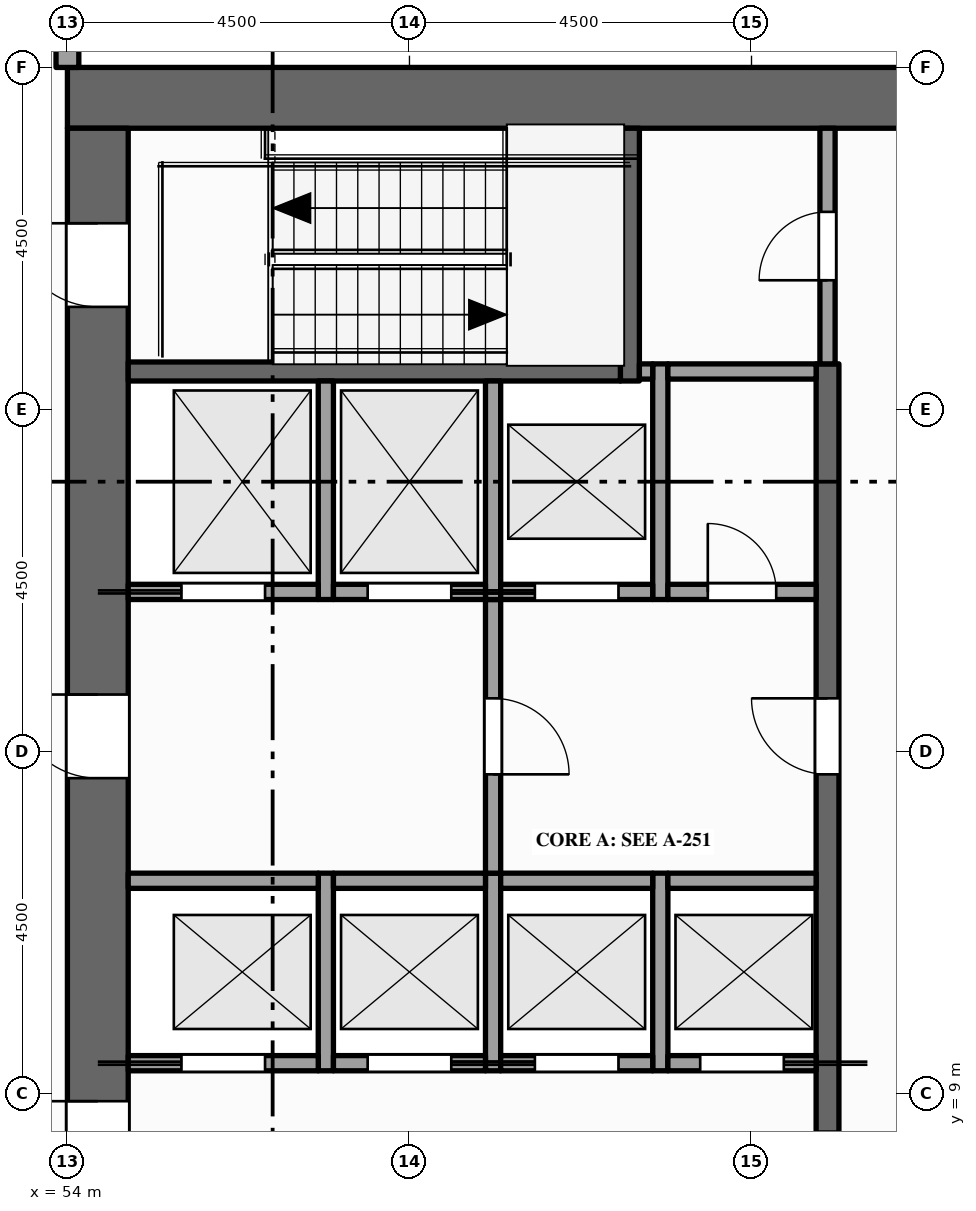
"""IFC4 building model, lengths in metres.
Left out: names, types, materials, properties, quantities, classifications, styles, units other than length and angle.
Written with IfcOpenShell. Run it as: python <this file> out.ifc"""

import sys

from ifc_helpers import new_model, si_unit, direction, frame, frame_2d, origin, place, context, subcontext, project, spatial, rectangle, extrude, element, fill, save


model = new_model("IFC4")
c1 = context("Model", 3, precision=1e-05, world=origin(), true_north=direction((0.0, 1.0)))
c2 = subcontext(c1, "Body", "Model", "MODEL_VIEW")
j1 = project(units=[si_unit("LENGTHUNIT", "METRE"), si_unit("PLANEANGLEUNIT", "RADIAN")], contexts=[c1])
p1 = place(None, origin())
s1 = spatial("IfcSite", under=j1, at=p1, CompositionType="ELEMENT")
p2 = place(p1, origin())
s2 = spatial("IfcBuilding", under=s1, at=p2, CompositionType="ELEMENT")
p3 = place(p2, frame((0.0, 0.0, 289.0)))
s3 = spatial("IfcBuildingStorey", under=s2, at=p3, CompositionType="ELEMENT", Elevation=289.0)
p4 = place(p3, frame((54.0, 22.1, -0.15), z_axis=(0.0, 0.0, 1.0), x_axis=(1.0, 0.0, 0.0)))
e1 = element("IfcWall", 1, at=p4, inside=s3, PredefinedType="SHEAR", context=c2, shape_type="SweptSolid", body=[
    extrude(rectangle(XDim=13.5, YDim=0.8, at=frame_2d((6.75, 0.0))), origin(), (0.0, 0.0, 1.0), 4.0),
])
p5 = place(p3, frame((54.4, 0.8, -0.15), z_axis=(0.0, 0.0, 1.0), x_axis=(0.0, 1.0, 0.0)))
e2 = element("IfcWall", 2, at=p5, inside=s3, PredefinedType="SHEAR", context=c2, shape_type="SweptSolid", body=[
    extrude(rectangle(XDim=20.9, YDim=0.8, at=frame_2d((10.45, 0.0))), origin(), (0.0, 0.0, 1.0), 4.0),
])
p6 = place(p5, frame((6.3, 0.0, 0.15)))
e3 = element("IfcOpeningElement", 3, at=p6, cuts=e2, PredefinedType="OPENING", context=c2, shape_type="SweptSolid", body=[
    extrude(rectangle(XDim=1.8, YDim=2.1, at=frame_2d((0.9, 1.05))), frame((0.0, 0.41, 0.0), z_axis=(0.0, -1.0, 0.0), x_axis=(1.0, 0.0, 0.0)), (0.0, 0.0, 1.0), 0.82),
])
p7 = place(p5, frame((12.35, 0.0, 0.15)))
e4 = element("IfcOpeningElement", 4, at=p7, cuts=e2, PredefinedType="OPENING", context=c2, shape_type="SweptSolid", body=[
    extrude(rectangle(XDim=1.1, YDim=2.1, at=frame_2d((0.55, 1.05))), frame((0.0, 0.41, 0.0), z_axis=(0.0, -1.0, 0.0), x_axis=(1.0, 0.0, 0.0)), (0.0, 0.0, 1.0), 0.82),
])
p8 = place(p5, frame((1.35, 0.0, 0.15)))
e5 = element("IfcOpeningElement", 5, at=p8, cuts=e2, PredefinedType="OPENING", context=c2, shape_type="SweptSolid", body=[
    extrude(rectangle(XDim=1.1, YDim=2.1, at=frame_2d((0.55, 1.05))), frame((0.0, 0.41, 0.0), z_axis=(0.0, -1.0, 0.0), x_axis=(1.0, 0.0, 0.0)), (0.0, 0.0, 1.0), 0.82),
])
p9 = place(p5, frame((18.55, 0.0, 0.15)))
e6 = element("IfcOpeningElement", 6, at=p9, cuts=e2, PredefinedType="OPENING", context=c2, shape_type="SweptSolid", body=[
    extrude(rectangle(XDim=1.1, YDim=2.1, at=frame_2d((0.55, 1.05))), frame((0.0, 0.41, 0.0), z_axis=(0.0, -1.0, 0.0), x_axis=(1.0, 0.0, 0.0)), (0.0, 0.0, 1.0), 0.82),
])
p10 = place(p3, frame((54.0, 22.5, 0.0), z_axis=(0.0, 0.0, 1.0), x_axis=(0.0, 1.0, 0.0)))
e7 = element("IfcWall", 7, at=p10, inside=s3, PredefinedType="STANDARD", context=c2, shape_type="SweptSolid", body=[
    extrude(rectangle(XDim=1.175, YDim=0.3, at=frame_2d((0.587, 0.0))), origin(), (0.0, 0.0, 1.0), 3.162),
])
p11 = place(p3, frame((57.4, 9.3, 0.0), z_axis=(0.0, 0.0, 1.0), x_axis=(0.0, 1.0, 0.0)))
e8 = element("IfcWall", 8, at=p11, inside=s3, PredefinedType="SOLIDWALL", context=c2, shape_type="SweptSolid", body=[
    extrude(rectangle(XDim=2.6, YDim=0.2, at=frame_2d((1.3, 0.0))), origin(), (0.0, 0.0, 1.0), 3.85),
])
p12 = place(p3, frame((57.4, 15.5, 0.0), z_axis=(0.0, 0.0, 1.0), x_axis=(0.0, 1.0, 0.0)))
e9 = element("IfcWall", 9, at=p12, inside=s3, PredefinedType="SOLIDWALL", context=c2, shape_type="SweptSolid", body=[
    extrude(rectangle(XDim=2.875, YDim=0.2, at=frame_2d((1.438, 0.0))), origin(), (0.0, 0.0, 1.0), 3.85),
])
p13 = place(p3, frame((59.6, 9.3, 0.0), z_axis=(0.0, 0.0, 1.0), x_axis=(0.0, 1.0, 0.0)))
e10 = element("IfcWall", 10, at=p13, inside=s3, PredefinedType="SOLIDWALL", context=c2, shape_type="SweptSolid", body=[
    extrude(rectangle(XDim=2.6, YDim=0.2, at=frame_2d((1.3, 0.0))), origin(), (0.0, 0.0, 1.0), 3.85),
])
p14 = place(p3, frame((59.6, 11.9, 0.0), z_axis=(0.0, 0.0, 1.0), x_axis=(0.0, 1.0, 0.0)))
e11 = element("IfcWall", 11, at=p14, inside=s3, PredefinedType="PARTITIONING", context=c2, shape_type="SweptSolid", body=[
    extrude(rectangle(XDim=3.6, YDim=0.2, at=frame_2d((1.8, 0.0))), origin(), (0.0, 0.0, 1.0), 3.85),
])
p15 = place(p14, frame((1.3, 0.0, 0.0)))
e12 = element("IfcOpeningElement", 12, at=p15, cuts=e11, PredefinedType="OPENING", context=c2, shape_type="SweptSolid", body=[
    extrude(rectangle(XDim=1.0, YDim=2.1, at=frame_2d((0.5, 1.05))), frame((0.0, 0.11, 0.0), z_axis=(0.0, -1.0, 0.0), x_axis=(1.0, 0.0, 0.0)), (0.0, 0.0, 1.0), 0.22),
])
p16 = place(p3, frame((59.6, 15.5, 0.0), z_axis=(0.0, 0.0, 1.0), x_axis=(0.0, 1.0, 0.0)))
e13 = element("IfcWall", 13, at=p16, inside=s3, PredefinedType="SOLIDWALL", context=c2, shape_type="SweptSolid", body=[
    extrude(rectangle(XDim=2.875, YDim=0.2, at=frame_2d((1.438, 0.0))), origin(), (0.0, 0.0, 1.0), 3.85),
])
p17 = place(p3, frame((61.4, 18.375, 0.0), z_axis=(0.0, 0.0, 1.0), x_axis=(0.0, 1.0, 0.0)))
e14 = element("IfcWall", 14, at=p17, inside=s3, PredefinedType="SHEAR", context=c2, shape_type="SweptSolid", body=[
    extrude(rectangle(XDim=3.325, YDim=0.25, at=frame_2d((1.663, 0.0))), origin(), (0.0, 0.0, 1.0), 3.85),
])
p18 = place(p3, frame((61.8, 9.3, 0.0), z_axis=(0.0, 0.0, 1.0), x_axis=(0.0, 1.0, 0.0)))
e15 = element("IfcWall", 15, at=p18, inside=s3, PredefinedType="SOLIDWALL", context=c2, shape_type="SweptSolid", body=[
    extrude(rectangle(XDim=2.6, YDim=0.2, at=frame_2d((1.3, 0.0))), origin(), (0.0, 0.0, 1.0), 3.85),
])
p19 = place(p3, frame((61.8, 15.5, 0.0), z_axis=(0.0, 0.0, 1.0), x_axis=(0.0, 1.0, 0.0)))
e16 = element("IfcWall", 16, at=p19, inside=s3, PredefinedType="SOLIDWALL", context=c2, shape_type="SweptSolid", body=[
    extrude(rectangle(XDim=3.1, YDim=0.2, at=frame_2d((1.55, 0.0))), origin(), (0.0, 0.0, 1.0), 3.85),
])
p20 = place(p3, frame((64.0, 4.1, 0.0), z_axis=(0.0, 0.0, 1.0), x_axis=(0.0, 1.0, 0.0)))
e17 = element("IfcWall", 17, at=p20, inside=s3, PredefinedType="SHEAR", context=c2, shape_type="SweptSolid", body=[
    extrude(rectangle(XDim=14.5, YDim=0.3, at=frame_2d((7.25, 0.0))), origin(), (0.0, 0.0, 1.0), 3.85),
])
p21 = place(p20, frame((3.4, 0.0, 0.0)))
e18 = element("IfcOpeningElement", 18, at=p21, cuts=e17, PredefinedType="OPENING", context=c2, shape_type="SweptSolid", body=[
    extrude(rectangle(XDim=1.0, YDim=2.1, at=frame_2d((0.5, 1.05))), frame((0.0, 0.16, 0.0), z_axis=(0.0, -1.0, 0.0), x_axis=(1.0, 0.0, 0.0)), (0.0, 0.0, 1.0), 0.32),
])
p22 = place(p20, frame((9.1, 0.0, 0.0)))
e19 = element("IfcOpeningElement", 19, at=p22, cuts=e17, PredefinedType="OPENING", context=c2, shape_type="SweptSolid", body=[
    extrude(rectangle(XDim=1.0, YDim=2.1, at=frame_2d((0.5, 1.05))), frame((0.0, 0.16, 0.0), z_axis=(0.0, -1.0, 0.0), x_axis=(1.0, 0.0, 0.0)), (0.0, 0.0, 1.0), 0.32),
])
p23 = place(p3, frame((64.0, 18.6, 0.0), z_axis=(0.0, 0.0, 1.0), x_axis=(0.0, 1.0, 0.0)))
e20 = element("IfcWall", 20, at=p23, inside=s3, PredefinedType="PARTITIONING", context=c2, shape_type="SweptSolid", body=[
    extrude(rectangle(XDim=3.1, YDim=0.2, at=frame_2d((1.55, 0.0))), origin(), (0.0, 0.0, 1.0), 3.85),
])
p24 = place(p23, frame((1.1, 0.0, 0.0)))
e21 = element("IfcOpeningElement", 21, at=p24, cuts=e20, PredefinedType="OPENING", context=c2, shape_type="SweptSolid", body=[
    extrude(rectangle(XDim=0.9, YDim=2.1, at=frame_2d((0.45, 1.05))), frame((0.0, 0.11, 0.0), z_axis=(0.0, -1.0, 0.0), x_axis=(1.0, 0.0, 0.0)), (0.0, 0.0, 1.0), 0.22),
])
p25 = place(p3, frame((54.8, 9.4, 0.0), z_axis=(0.0, 0.0, 1.0), x_axis=(1.0, 0.0, 0.0)))
e22 = element("IfcWall", 22, at=p25, inside=s3, PredefinedType="SOLIDWALL", context=c2, shape_type="SweptSolid", body=[
    extrude(rectangle(XDim=2.5, YDim=0.2, at=frame_2d((1.25, 0.0))), origin(), (0.0, 0.0, 1.0), 3.85),
])
p26 = place(p25, frame((0.7, 0.0, 0.012)))
e23 = element("IfcOpeningElement", 23, at=p26, cuts=e22, PredefinedType="OPENING", context=c2, shape_type="SweptSolid", body=[
    extrude(rectangle(XDim=1.1, YDim=2.1, at=frame_2d((0.55, 1.05))), frame((0.0, 0.11, 0.0), z_axis=(0.0, -1.0, 0.0), x_axis=(1.0, 0.0, 0.0)), (0.0, 0.0, 1.0), 0.22),
])
p27 = place(p3, frame((57.5, 9.4, 0.0), z_axis=(0.0, 0.0, 1.0), x_axis=(1.0, 0.0, 0.0)))
e24 = element("IfcWall", 24, at=p27, inside=s3, PredefinedType="SOLIDWALL", context=c2, shape_type="SweptSolid", body=[
    extrude(rectangle(XDim=2.0, YDim=0.2, at=frame_2d((1.0, 0.0))), origin(), (0.0, 0.0, 1.0), 3.85),
])
p28 = place(p27, frame((0.45, 0.0, 0.012)))
e25 = element("IfcOpeningElement", 25, at=p28, cuts=e24, PredefinedType="OPENING", context=c2, shape_type="SweptSolid", body=[
    extrude(rectangle(XDim=1.1, YDim=2.1, at=frame_2d((0.55, 1.05))), frame((0.0, 0.11, 0.0), z_axis=(0.0, -1.0, 0.0), x_axis=(1.0, 0.0, 0.0)), (0.0, 0.0, 1.0), 0.22),
])
p29 = place(p3, frame((59.7, 9.4, 0.0), z_axis=(0.0, 0.0, 1.0), x_axis=(1.0, 0.0, 0.0)))
e26 = element("IfcWall", 26, at=p29, inside=s3, PredefinedType="SOLIDWALL", context=c2, shape_type="SweptSolid", body=[
    extrude(rectangle(XDim=2.0, YDim=0.2, at=frame_2d((1.0, 0.0))), origin(), (0.0, 0.0, 1.0), 3.85),
])
p30 = place(p29, frame((0.45, 0.0, 0.012)))
e27 = element("IfcOpeningElement", 27, at=p30, cuts=e26, PredefinedType="OPENING", context=c2, shape_type="SweptSolid", body=[
    extrude(rectangle(XDim=1.1, YDim=2.1, at=frame_2d((0.55, 1.05))), frame((0.0, 0.11, 0.0), z_axis=(0.0, -1.0, 0.0), x_axis=(1.0, 0.0, 0.0)), (0.0, 0.0, 1.0), 0.22),
])
p31 = place(p3, frame((61.9, 9.4, 0.0), z_axis=(0.0, 0.0, 1.0), x_axis=(1.0, 0.0, 0.0)))
e28 = element("IfcWall", 28, at=p31, inside=s3, PredefinedType="SOLIDWALL", context=c2, shape_type="SweptSolid", body=[
    extrude(rectangle(XDim=1.95, YDim=0.2, at=frame_2d((0.975, 0.0))), origin(), (0.0, 0.0, 1.0), 3.85),
])
p32 = place(p31, frame((0.425, 0.0, 0.012)))
e29 = element("IfcOpeningElement", 29, at=p32, cuts=e28, PredefinedType="OPENING", context=c2, shape_type="SweptSolid", body=[
    extrude(rectangle(XDim=1.1, YDim=2.1, at=frame_2d((0.55, 1.05))), frame((0.0, 0.11, 0.0), z_axis=(0.0, -1.0, 0.0), x_axis=(1.0, 0.0, 0.0)), (0.0, 0.0, 1.0), 0.22),
])
p33 = place(p3, frame((54.8, 11.8, 0.0), z_axis=(0.0, 0.0, 1.0), x_axis=(1.0, 0.0, 0.0)))
e30 = element("IfcWall", 30, at=p33, inside=s3, PredefinedType="SOLIDWALL", context=c2, shape_type="SweptSolid", body=[
    extrude(rectangle(XDim=2.5, YDim=0.2, at=frame_2d((1.25, 0.0))), origin(), (0.0, 0.0, 1.0), 3.85),
])
for number, where, z_axis, x_axis in (
    (31, (57.5, 11.8, 0.0), (0.0, 0.0, 1.0), (1.0, 0.0, 0.0)),
    (32, (59.7, 11.8, 0.0), (0.0, 0.0, 1.0), (1.0, 0.0, 0.0)),
):
    element("IfcWall", number, at=place(p3, frame(where, z_axis=z_axis, x_axis=x_axis)), inside=s3, PredefinedType="SOLIDWALL", context=c2, shape_type="SweptSolid", body=[
        extrude(rectangle(XDim=2.0, YDim=0.2, at=frame_2d((1.0, 0.0))), origin(), (0.0, 0.0, 1.0), 3.85),
    ])
p34 = place(p3, frame((61.9, 11.8, 0.0), z_axis=(0.0, 0.0, 1.0), x_axis=(1.0, 0.0, 0.0)))
e33 = element("IfcWall", 33, at=p34, inside=s3, PredefinedType="SOLIDWALL", context=c2, shape_type="SweptSolid", body=[
    extrude(rectangle(XDim=1.95, YDim=0.2, at=frame_2d((0.975, 0.0))), origin(), (0.0, 0.0, 1.0), 3.85),
])
p35 = place(p3, frame((54.8, 15.6, 0.0), z_axis=(0.0, 0.0, 1.0), x_axis=(1.0, 0.0, 0.0)))
e34 = element("IfcWall", 34, at=p35, inside=s3, PredefinedType="SOLIDWALL", context=c2, shape_type="SweptSolid", body=[
    extrude(rectangle(XDim=2.5, YDim=0.2, at=frame_2d((1.25, 0.0))), origin(), (0.0, 0.0, 1.0), 3.85),
])
p36 = place(p35, frame((0.7, 0.0, 0.012)))
e35 = element("IfcOpeningElement", 35, at=p36, cuts=e34, PredefinedType="OPENING", context=c2, shape_type="SweptSolid", body=[
    extrude(rectangle(XDim=1.1, YDim=2.1, at=frame_2d((0.55, 1.05))), frame((0.0, 0.11, 0.0), z_axis=(0.0, -1.0, 0.0), x_axis=(1.0, 0.0, 0.0)), (0.0, 0.0, 1.0), 0.22),
])
p37 = place(p3, frame((57.5, 15.6, 0.0), z_axis=(0.0, 0.0, 1.0), x_axis=(1.0, 0.0, 0.0)))
e36 = element("IfcWall", 36, at=p37, inside=s3, PredefinedType="SOLIDWALL", context=c2, shape_type="SweptSolid", body=[
    extrude(rectangle(XDim=2.0, YDim=0.2, at=frame_2d((1.0, 0.0))), origin(), (0.0, 0.0, 1.0), 3.85),
])
p38 = place(p37, frame((0.45, 0.0, 0.012)))
e37 = element("IfcOpeningElement", 37, at=p38, cuts=e36, PredefinedType="OPENING", context=c2, shape_type="SweptSolid", body=[
    extrude(rectangle(XDim=1.1, YDim=2.1, at=frame_2d((0.55, 1.05))), frame((0.0, 0.11, 0.0), z_axis=(0.0, -1.0, 0.0), x_axis=(1.0, 0.0, 0.0)), (0.0, 0.0, 1.0), 0.22),
])
p39 = place(p3, frame((59.7, 15.6, 0.0), z_axis=(0.0, 0.0, 1.0), x_axis=(1.0, 0.0, 0.0)))
e38 = element("IfcWall", 38, at=p39, inside=s3, PredefinedType="SOLIDWALL", context=c2, shape_type="SweptSolid", body=[
    extrude(rectangle(XDim=2.0, YDim=0.2, at=frame_2d((1.0, 0.0))), origin(), (0.0, 0.0, 1.0), 3.85),
])
p40 = place(p39, frame((0.45, 0.0, 0.012)))
e39 = element("IfcOpeningElement", 39, at=p40, cuts=e38, PredefinedType="OPENING", context=c2, shape_type="SweptSolid", body=[
    extrude(rectangle(XDim=1.1, YDim=2.1, at=frame_2d((0.55, 1.05))), frame((0.0, 0.11, 0.0), z_axis=(0.0, -1.0, 0.0), x_axis=(1.0, 0.0, 0.0)), (0.0, 0.0, 1.0), 0.22),
])
p41 = place(p3, frame((61.9, 15.6, 0.0), z_axis=(0.0, 0.0, 1.0), x_axis=(1.0, 0.0, 0.0)))
e40 = element("IfcWall", 40, at=p41, inside=s3, PredefinedType="PARTITIONING", context=c2, shape_type="SweptSolid", body=[
    extrude(rectangle(XDim=1.95, YDim=0.2, at=frame_2d((0.975, 0.0))), origin(), (0.0, 0.0, 1.0), 3.85),
])
p42 = place(p41, frame((0.525, 0.0, 0.0)))
e41 = element("IfcOpeningElement", 41, at=p42, cuts=e40, PredefinedType="OPENING", context=c2, shape_type="SweptSolid", body=[
    extrude(rectangle(XDim=0.9, YDim=2.1, at=frame_2d((0.45, 1.05))), frame((0.0, 0.11, 0.0), z_axis=(0.0, -1.0, 0.0), x_axis=(1.0, 0.0, 0.0)), (0.0, 0.0, 1.0), 0.22),
])
p43 = place(p3, frame((54.8, 18.5, 0.0), z_axis=(0.0, 0.0, 1.0), x_axis=(1.0, 0.0, 0.0)))
e42 = element("IfcWall", 42, at=p43, inside=s3, PredefinedType="SHEAR", context=c2, shape_type="SweptSolid", body=[
    extrude(rectangle(XDim=6.475, YDim=0.25, at=frame_2d((3.237, 0.0))), origin(), (0.0, 0.0, 1.0), 3.85),
])
p44 = place(p3, frame((61.525, 18.5, 0.0), z_axis=(0.0, 0.0, 1.0), x_axis=(1.0, 0.0, 0.0)))
e43 = element("IfcWall", 43, at=p44, inside=s3, PredefinedType="SOLIDWALL", context=c2, shape_type="SweptSolid", body=[
    extrude(rectangle(XDim=0.175, YDim=0.2, at=frame_2d((0.087, 0.0))), origin(), (0.0, 0.0, 1.0), 3.85),
])
p45 = place(p3, frame((61.9, 18.5, 0.0), z_axis=(0.0, 0.0, 1.0), x_axis=(1.0, 0.0, 0.0)))
e44 = element("IfcWall", 44, at=p45, inside=s3, PredefinedType="PARTITIONING", context=c2, shape_type="SweptSolid", body=[
    extrude(rectangle(XDim=1.95, YDim=0.2, at=frame_2d((0.975, 0.0))), origin(), (0.0, 0.0, 1.0), 3.85),
])
p46 = place(p26, origin())
e45 = element("IfcDoor", 45, at=p46, inside=s3, OperationType="SLIDING_TO_LEFT", PredefinedType="DOOR", context=c2, shape_type="SweptSolid", body=[
    extrude(rectangle(XDim=1.1, YDim=2.1, at=frame_2d((0.55, 1.05))), frame((0.0, 0.025, 0.0), z_axis=(0.0, -1.0, 0.0), x_axis=(1.0, 0.0, 0.0)), (0.0, 0.0, 1.0), 0.05),
])
fill(e23, e45)
p47 = place(p28, origin())
e46 = element("IfcDoor", 46, at=p47, inside=s3, OperationType="SLIDING_TO_RIGHT", PredefinedType="DOOR", context=c2, shape_type="SweptSolid", body=[
    extrude(rectangle(XDim=1.1, YDim=2.1, at=frame_2d((0.55, 1.05))), frame((0.0, 0.025, 0.0), z_axis=(0.0, -1.0, 0.0), x_axis=(1.0, 0.0, 0.0)), (0.0, 0.0, 1.0), 0.05),
])
fill(e25, e46)
p48 = place(p30, origin())
e47 = element("IfcDoor", 47, at=p48, inside=s3, OperationType="SLIDING_TO_LEFT", PredefinedType="DOOR", context=c2, shape_type="SweptSolid", body=[
    extrude(rectangle(XDim=1.1, YDim=2.1, at=frame_2d((0.55, 1.05))), frame((0.0, 0.025, 0.0), z_axis=(0.0, -1.0, 0.0), x_axis=(1.0, 0.0, 0.0)), (0.0, 0.0, 1.0), 0.05),
])
fill(e27, e47)
p49 = place(p32, origin())
e48 = element("IfcDoor", 48, at=p49, inside=s3, OperationType="SLIDING_TO_RIGHT", PredefinedType="DOOR", context=c2, shape_type="SweptSolid", body=[
    extrude(rectangle(XDim=1.1, YDim=2.1, at=frame_2d((0.55, 1.05))), frame((0.0, 0.025, 0.0), z_axis=(0.0, -1.0, 0.0), x_axis=(1.0, 0.0, 0.0)), (0.0, 0.0, 1.0), 0.05),
])
fill(e29, e48)
p50 = place(p36, origin())
e49 = element("IfcDoor", 49, at=p50, inside=s3, OperationType="SLIDING_TO_LEFT", PredefinedType="DOOR", context=c2, shape_type="SweptSolid", body=[
    extrude(rectangle(XDim=1.1, YDim=2.1, at=frame_2d((0.55, 1.05))), frame((0.0, 0.025, 0.0), z_axis=(0.0, -1.0, 0.0), x_axis=(1.0, 0.0, 0.0)), (0.0, 0.0, 1.0), 0.05),
])
fill(e35, e49)
p51 = place(p38, origin())
e50 = element("IfcDoor", 50, at=p51, inside=s3, OperationType="SLIDING_TO_RIGHT", PredefinedType="DOOR", context=c2, shape_type="SweptSolid", body=[
    extrude(rectangle(XDim=1.1, YDim=2.1, at=frame_2d((0.55, 1.05))), frame((0.0, 0.025, 0.0), z_axis=(0.0, -1.0, 0.0), x_axis=(1.0, 0.0, 0.0)), (0.0, 0.0, 1.0), 0.05),
])
fill(e37, e50)
p52 = place(p40, origin())
e51 = element("IfcDoor", 51, at=p52, inside=s3, OperationType="SLIDING_TO_LEFT", PredefinedType="DOOR", context=c2, shape_type="SweptSolid", body=[
    extrude(rectangle(XDim=1.1, YDim=2.1, at=frame_2d((0.55, 1.05))), frame((0.0, 0.025, 0.0), z_axis=(0.0, -1.0, 0.0), x_axis=(1.0, 0.0, 0.0)), (0.0, 0.0, 1.0), 0.05),
])
fill(e39, e51)
p53 = place(p6, origin())
e52 = element("IfcDoor", 52, at=p53, inside=s3, OperationType="DOUBLE_DOOR_SINGLE_SWING", PredefinedType="DOOR", context=c2, shape_type="SweptSolid", body=[
    extrude(rectangle(XDim=1.8, YDim=2.1, at=frame_2d((0.9, 1.05))), frame((0.0, 0.025, 0.0), z_axis=(0.0, -1.0, 0.0), x_axis=(1.0, 0.0, 0.0)), (0.0, 0.0, 1.0), 0.05),
])
fill(e3, e52)
p54 = place(p7, origin())
e53 = element("IfcDoor", 53, at=p54, inside=s3, OperationType="SINGLE_SWING_RIGHT", PredefinedType="DOOR", context=c2, shape_type="SweptSolid", body=[
    extrude(rectangle(XDim=1.1, YDim=2.1, at=frame_2d((0.55, 1.05))), frame((0.0, 0.025, 0.0), z_axis=(0.0, -1.0, 0.0), x_axis=(1.0, 0.0, 0.0)), (0.0, 0.0, 1.0), 0.05),
])
fill(e4, e53)
p55 = place(p15, origin())
e54 = element("IfcDoor", 54, at=p55, inside=s3, OperationType="SINGLE_SWING_LEFT", PredefinedType="DOOR", context=c2, shape_type="SweptSolid", body=[
    extrude(rectangle(XDim=1.0, YDim=2.1, at=frame_2d((0.5, 1.05))), frame((0.0, 0.025, 0.0), z_axis=(0.0, -1.0, 0.0), x_axis=(1.0, 0.0, 0.0)), (0.0, 0.0, 1.0), 0.05),
])
fill(e12, e54)
p56 = place(p22, origin())
e55 = element("IfcDoor", 55, at=p56, inside=s3, OperationType="SINGLE_SWING_RIGHT", PredefinedType="DOOR", context=c2, shape_type="SweptSolid", body=[
    extrude(rectangle(XDim=1.0, YDim=2.1, at=frame_2d((0.5, 1.05))), frame((0.0, 0.025, 0.0), z_axis=(0.0, -1.0, 0.0), x_axis=(1.0, 0.0, 0.0)), (0.0, 0.0, 1.0), 0.05),
])
fill(e19, e55)
p57 = place(p9, origin())
e56 = element("IfcDoor", 56, at=p57, inside=s3, OperationType="SINGLE_SWING_RIGHT", PredefinedType="DOOR", context=c2, shape_type="SweptSolid", body=[
    extrude(rectangle(XDim=1.1, YDim=2.1, at=frame_2d((0.55, 1.05))), frame((0.0, 0.025, 0.0), z_axis=(0.0, -1.0, 0.0), x_axis=(1.0, 0.0, 0.0)), (0.0, 0.0, 1.0), 0.05),
])
fill(e6, e56)
p58 = place(p24, origin())
e57 = element("IfcDoor", 57, at=p58, inside=s3, OperationType="SINGLE_SWING_LEFT", PredefinedType="DOOR", context=c2, shape_type="SweptSolid", body=[
    extrude(rectangle(XDim=0.9, YDim=2.1, at=frame_2d((0.45, 1.05))), frame((0.0, 0.025, 0.0), z_axis=(0.0, -1.0, 0.0), x_axis=(1.0, 0.0, 0.0)), (0.0, 0.0, 1.0), 0.05),
])
fill(e21, e57)
p59 = place(p42, origin())
e58 = element("IfcDoor", 58, at=p59, inside=s3, OperationType="SINGLE_SWING_LEFT", PredefinedType="DOOR", context=c2, shape_type="SweptSolid", body=[
    extrude(rectangle(XDim=0.9, YDim=2.1, at=frame_2d((0.45, 1.05))), frame((0.0, 0.025, 0.0), z_axis=(0.0, -1.0, 0.0), x_axis=(1.0, 0.0, 0.0)), (0.0, 0.0, 1.0), 0.05),
])
fill(e41, e58)
save(model, sys.argv[1])
